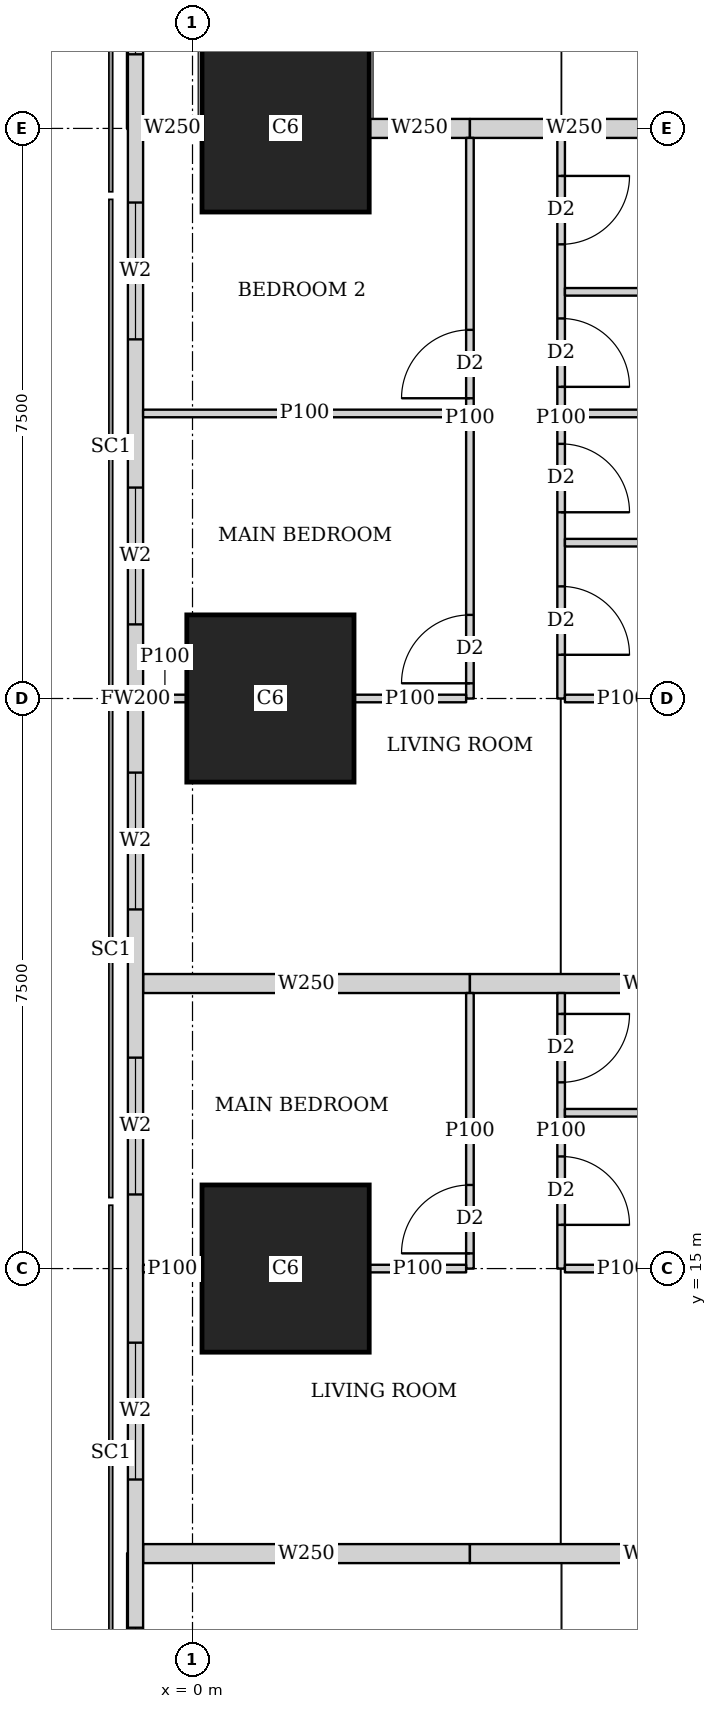
"""IFC4 building model, lengths in metres.
Left out: names, types, materials, properties, quantities, classifications, styles, units other than length and angle.
Written with IfcOpenShell. Run it as: python <this file> out.ifc"""

import sys

from ifc_helpers import new_model, si_unit, direction, frame, frame_2d, origin, origin_2d, place, context, subcontext, project, spatial, rectangle, extrude, element, fill, save


model = new_model("IFC4")
c1 = context("Model", 3, precision=1e-05, world=origin(), true_north=direction((0.0, 1.0)))
c2 = subcontext(c1, "Body", "Model", "MODEL_VIEW")
j1 = project(units=[si_unit("LENGTHUNIT", "METRE"), si_unit("PLANEANGLEUNIT", "RADIAN")], contexts=[c1])
p1 = place(None, origin())
s1 = spatial("IfcSite", under=j1, at=p1, CompositionType="ELEMENT")
p2 = place(p1, origin())
s2 = spatial("IfcBuilding", under=s1, at=p2, CompositionType="ELEMENT")
p3 = place(p2, frame((0.0, 0.0, 89.15)))
s3 = spatial("IfcBuildingStorey", under=s2, at=p3, CompositionType="ELEMENT", Elevation=89.15)
for number, where, z_axis, x_axis in (
    (1, (1.225, 15.0, 0.0), (0.0, 0.0, 1.0), (1.0, 0.0, 0.0)),
    (2, (1.025, 22.5, 0.0), (0.0, 0.0, 1.0), (1.0, 0.0, 0.0)),
    (3, (1.225, 30.0, 0.0), (0.0, 0.0, 1.0), (1.0, 0.0, 0.0)),
):
    element("IfcColumn", number, at=place(p3, frame(where, z_axis=z_axis, x_axis=x_axis)), inside=s3, PredefinedType="COLUMN", context=c2, shape_type="SweptSolid", body=[
        extrude(rectangle(XDim=2.2, YDim=2.2, at=origin_2d()), origin(), (0.0, 0.0, 1.0), 3.75),
    ])
p4 = place(p3, frame((-0.75, 42.837, 0.0), z_axis=(0.0, 0.0, 1.0), x_axis=(0.0, -1.0, 0.0)))
e4 = element("IfcWall", 4, at=p4, inside=s3, PredefinedType="SOLIDWALL", context=c2, shape_type="SweptSolid", body=[
    extrude(rectangle(XDim=40.674, YDim=0.2, at=frame_2d((20.337, 0.0))), origin(), (0.0, 0.0, 1.0), 3.5),
])
p5 = place(p4, frame((1.78, 0.0, 0.9)))
e5 = element("IfcOpeningElement", 5, at=p5, cuts=e4, PredefinedType="OPENING", context=c2, shape_type="SweptSolid", body=[
    extrude(rectangle(XDim=1.8, YDim=1.5, at=frame_2d((0.9, 0.75))), frame((0.0, 0.11, 0.0), z_axis=(0.0, -1.0, 0.0), x_axis=(1.0, 0.0, 0.0)), (0.0, 0.0, 1.0), 0.22),
])
p6 = place(p4, frame((6.312, 0.0, 0.9)))
e6 = element("IfcOpeningElement", 6, at=p6, cuts=e4, PredefinedType="OPENING", context=c2, shape_type="SweptSolid", body=[
    extrude(rectangle(XDim=1.8, YDim=1.5, at=frame_2d((0.9, 0.75))), frame((0.0, 0.11, 0.0), z_axis=(0.0, -1.0, 0.0), x_axis=(1.0, 0.0, 0.0)), (0.0, 0.0, 1.0), 0.22),
])
p7 = place(p4, frame((10.062, 0.0, 0.9)))
e7 = element("IfcOpeningElement", 7, at=p7, cuts=e4, PredefinedType="OPENING", context=c2, shape_type="SweptSolid", body=[
    extrude(rectangle(XDim=1.8, YDim=1.5, at=frame_2d((0.9, 0.75))), frame((0.0, 0.11, 0.0), z_axis=(0.0, -1.0, 0.0), x_axis=(1.0, 0.0, 0.0)), (0.0, 0.0, 1.0), 0.22),
])
p8 = place(p4, frame((13.812, 0.0, 0.9)))
e8 = element("IfcOpeningElement", 8, at=p8, cuts=e4, PredefinedType="OPENING", context=c2, shape_type="SweptSolid", body=[
    extrude(rectangle(XDim=1.8, YDim=1.5, at=frame_2d((0.9, 0.75))), frame((0.0, 0.11, 0.0), z_axis=(0.0, -1.0, 0.0), x_axis=(1.0, 0.0, 0.0)), (0.0, 0.0, 1.0), 0.22),
])
p9 = place(p4, frame((17.562, 0.0, 0.9)))
e9 = element("IfcOpeningElement", 9, at=p9, cuts=e4, PredefinedType="OPENING", context=c2, shape_type="SweptSolid", body=[
    extrude(rectangle(XDim=1.8, YDim=1.5, at=frame_2d((0.9, 0.75))), frame((0.0, 0.11, 0.0), z_axis=(0.0, -1.0, 0.0), x_axis=(1.0, 0.0, 0.0)), (0.0, 0.0, 1.0), 0.22),
])
p10 = place(p4, frame((21.312, 0.0, 0.9)))
e10 = element("IfcOpeningElement", 10, at=p10, cuts=e4, PredefinedType="OPENING", context=c2, shape_type="SweptSolid", body=[
    extrude(rectangle(XDim=1.8, YDim=1.5, at=frame_2d((0.9, 0.75))), frame((0.0, 0.11, 0.0), z_axis=(0.0, -1.0, 0.0), x_axis=(1.0, 0.0, 0.0)), (0.0, 0.0, 1.0), 0.22),
])
p11 = place(p4, frame((25.062, 0.0, 0.9)))
e11 = element("IfcOpeningElement", 11, at=p11, cuts=e4, PredefinedType="OPENING", context=c2, shape_type="SweptSolid", body=[
    extrude(rectangle(XDim=1.8, YDim=1.5, at=frame_2d((0.9, 0.75))), frame((0.0, 0.11, 0.0), z_axis=(0.0, -1.0, 0.0), x_axis=(1.0, 0.0, 0.0)), (0.0, 0.0, 1.0), 0.22),
])
p12 = place(p4, frame((28.812, 0.0, 0.9)))
e12 = element("IfcOpeningElement", 12, at=p12, cuts=e4, PredefinedType="OPENING", context=c2, shape_type="SweptSolid", body=[
    extrude(rectangle(XDim=1.8, YDim=1.5, at=frame_2d((0.9, 0.75))), frame((0.0, 0.11, 0.0), z_axis=(0.0, -1.0, 0.0), x_axis=(1.0, 0.0, 0.0)), (0.0, 0.0, 1.0), 0.22),
])
p13 = place(p4, frame((32.562, 0.0, 0.9)))
e13 = element("IfcOpeningElement", 13, at=p13, cuts=e4, PredefinedType="OPENING", context=c2, shape_type="SweptSolid", body=[
    extrude(rectangle(XDim=1.8, YDim=1.5, at=frame_2d((0.9, 0.75))), frame((0.0, 0.11, 0.0), z_axis=(0.0, -1.0, 0.0), x_axis=(1.0, 0.0, 0.0)), (0.0, 0.0, 1.0), 0.22),
])
p14 = place(p4, frame((37.094, 0.0, 0.9)))
e14 = element("IfcOpeningElement", 14, at=p14, cuts=e4, PredefinedType="OPENING", context=c2, shape_type="SweptSolid", body=[
    extrude(rectangle(XDim=1.8, YDim=1.5, at=frame_2d((0.9, 0.75))), frame((0.0, 0.11, 0.0), z_axis=(0.0, -1.0, 0.0), x_axis=(1.0, 0.0, 0.0)), (0.0, 0.0, 1.0), 0.22),
])
p15 = place(p3, frame((3.65, 15.0, 0.0), z_axis=(0.0, 0.0, 1.0), x_axis=(0.0, 1.0, 0.0)))
e15 = element("IfcWall", 15, at=p15, inside=s3, PredefinedType="PARTITIONING", context=c2, shape_type="SweptSolid", body=[
    extrude(rectangle(XDim=3.625, YDim=0.1, at=frame_2d((1.812, 0.0))), origin(), (0.0, 0.0, 1.0), 3.5),
])
p16 = place(p15, frame((0.2, 0.0, 0.0)))
e16 = element("IfcOpeningElement", 16, at=p16, cuts=e15, PredefinedType="OPENING", context=c2, shape_type="SweptSolid", body=[
    extrude(rectangle(XDim=0.9, YDim=2.1, at=frame_2d((0.45, 1.05))), frame((0.0, 0.06, 0.0), z_axis=(0.0, -1.0, 0.0), x_axis=(1.0, 0.0, 0.0)), (0.0, 0.0, 1.0), 0.12),
])
p17 = place(p3, frame((4.85, 15.0, 0.0), z_axis=(0.0, 0.0, 1.0), x_axis=(0.0, 1.0, 0.0)))
e17 = element("IfcWall", 17, at=p17, inside=s3, PredefinedType="PARTITIONING", context=c2, shape_type="SweptSolid", body=[
    extrude(rectangle(XDim=3.625, YDim=0.1, at=frame_2d((1.812, 0.0))), origin(), (0.0, 0.0, 1.0), 3.5),
])
p18 = place(p17, frame((0.575, 0.0, 0.0)))
e18 = element("IfcOpeningElement", 18, at=p18, cuts=e17, PredefinedType="OPENING", context=c2, shape_type="SweptSolid", body=[
    extrude(rectangle(XDim=0.9, YDim=2.1, at=frame_2d((0.45, 1.05))), frame((0.0, 0.06, 0.0), z_axis=(0.0, -1.0, 0.0), x_axis=(1.0, 0.0, 0.0)), (0.0, 0.0, 1.0), 0.12),
])
p19 = place(p17, frame((2.45, 0.0, 0.0)))
e19 = element("IfcOpeningElement", 19, at=p19, cuts=e17, PredefinedType="OPENING", context=c2, shape_type="SweptSolid", body=[
    extrude(rectangle(XDim=0.9, YDim=2.1, at=frame_2d((0.45, 1.05))), frame((0.0, 0.06, 0.0), z_axis=(0.0, -1.0, 0.0), x_axis=(1.0, 0.0, 0.0)), (0.0, 0.0, 1.0), 0.12),
])
p20 = place(p3, frame((-0.65, 15.0, 0.0), z_axis=(0.0, 0.0, 1.0), x_axis=(1.0, 0.0, 0.0)))
e20 = element("IfcWall", 20, at=p20, inside=s3, PredefinedType="PARTITIONING", context=c2, shape_type="SweptSolid", body=[
    extrude(rectangle(XDim=0.774, YDim=0.1, at=frame_2d((0.387, 0.0))), origin(), (0.0, 0.0, 1.0), 3.5),
])
p21 = place(p3, frame((2.326, 15.0, 0.0), z_axis=(0.0, 0.0, 1.0), x_axis=(1.0, 0.0, 0.0)))
e21 = element("IfcWall", 21, at=p21, inside=s3, PredefinedType="PARTITIONING", context=c2, shape_type="SweptSolid", body=[
    extrude(rectangle(XDim=1.274, YDim=0.1, at=frame_2d((0.637, 0.0))), origin(), (0.0, 0.0, 1.0), 3.5),
])
p22 = place(p3, frame((4.9, 15.0, 0.0), z_axis=(0.0, 0.0, 1.0), x_axis=(1.0, 0.0, 0.0)))
e22 = element("IfcWall", 22, at=p22, inside=s3, PredefinedType="PARTITIONING", context=c2, shape_type="SweptSolid", body=[
    extrude(rectangle(XDim=1.499, YDim=0.1, at=frame_2d((0.75, 0.0))), origin(), (0.0, 0.0, 1.0), 3.5),
])
p23 = place(p3, frame((4.9, 17.05, 0.0), z_axis=(0.0, 0.0, 1.0), x_axis=(1.0, 0.0, 0.0)))
e23 = element("IfcWall", 23, at=p23, inside=s3, PredefinedType="PARTITIONING", context=c2, shape_type="SweptSolid", body=[
    extrude(rectangle(XDim=3.525, YDim=0.1, at=frame_2d((1.763, 0.0))), origin(), (0.0, 0.0, 1.0), 3.5),
])
p24 = place(p3, frame((-0.65, 11.25, 0.0), z_axis=(0.0, 0.0, 1.0), x_axis=(1.0, 0.0, 0.0)))
e24 = element("IfcWall", 24, at=p24, inside=s3, PredefinedType="SOLIDWALL", context=c2, shape_type="SweptSolid", body=[
    extrude(rectangle(XDim=4.3, YDim=0.25, at=frame_2d((2.15, 0.0))), origin(), (0.0, 0.0, 1.0), 2.2),
])
p25 = place(p3, frame((3.65, 11.25, 0.0), z_axis=(0.0, 0.0, 1.0), x_axis=(1.0, 0.0, 0.0)))
e25 = element("IfcWall", 25, at=p25, inside=s3, PredefinedType="SOLIDWALL", context=c2, shape_type="SweptSolid", body=[
    extrude(rectangle(XDim=4.775, YDim=0.25, at=frame_2d((2.388, 0.0))), origin(), (0.0, 0.0, 1.0), 3.5),
])
p26 = place(p3, frame((3.65, 22.5, 0.0), z_axis=(0.0, 0.0, 1.0), x_axis=(0.0, 1.0, 0.0)))
e26 = element("IfcWall", 26, at=p26, inside=s3, PredefinedType="PARTITIONING", context=c2, shape_type="SweptSolid", body=[
    extrude(rectangle(XDim=7.375, YDim=0.1, at=frame_2d((3.688, 0.0))), origin(), (0.0, 0.0, 1.0), 3.5),
])
p27 = place(p26, frame((0.2, 0.0, 0.0)))
e27 = element("IfcOpeningElement", 27, at=p27, cuts=e26, PredefinedType="OPENING", context=c2, shape_type="SweptSolid", body=[
    extrude(rectangle(XDim=0.9, YDim=2.1, at=frame_2d((0.45, 1.05))), frame((0.0, 0.06, 0.0), z_axis=(0.0, -1.0, 0.0), x_axis=(1.0, 0.0, 0.0)), (0.0, 0.0, 1.0), 0.12),
])
p28 = place(p26, frame((3.95, 0.0, 0.0)))
e28 = element("IfcOpeningElement", 28, at=p28, cuts=e26, PredefinedType="OPENING", context=c2, shape_type="SweptSolid", body=[
    extrude(rectangle(XDim=0.9, YDim=2.1, at=frame_2d((0.45, 1.05))), frame((0.0, 0.06, 0.0), z_axis=(0.0, -1.0, 0.0), x_axis=(1.0, 0.0, 0.0)), (0.0, 0.0, 1.0), 0.12),
])
p29 = place(p3, frame((4.85, 22.5, 0.0), z_axis=(0.0, 0.0, 1.0), x_axis=(0.0, 1.0, 0.0)))
e29 = element("IfcWall", 29, at=p29, inside=s3, PredefinedType="PARTITIONING", context=c2, shape_type="SweptSolid", body=[
    extrude(rectangle(XDim=7.375, YDim=0.1, at=frame_2d((3.688, 0.0))), origin(), (0.0, 0.0, 1.0), 3.5),
])
p30 = place(p29, frame((0.575, 0.0, 0.0)))
e30 = element("IfcOpeningElement", 30, at=p30, cuts=e29, PredefinedType="OPENING", context=c2, shape_type="SweptSolid", body=[
    extrude(rectangle(XDim=0.9, YDim=2.1, at=frame_2d((0.45, 1.05))), frame((0.0, 0.06, 0.0), z_axis=(0.0, -1.0, 0.0), x_axis=(1.0, 0.0, 0.0)), (0.0, 0.0, 1.0), 0.12),
])
p31 = place(p29, frame((4.1, 0.0, 0.0)))
e31 = element("IfcOpeningElement", 31, at=p31, cuts=e29, PredefinedType="OPENING", context=c2, shape_type="SweptSolid", body=[
    extrude(rectangle(XDim=0.9, YDim=2.1, at=frame_2d((0.45, 1.05))), frame((0.0, 0.06, 0.0), z_axis=(0.0, -1.0, 0.0), x_axis=(1.0, 0.0, 0.0)), (0.0, 0.0, 1.0), 0.12),
])
p32 = place(p29, frame((2.45, 0.0, 0.0)))
e32 = element("IfcOpeningElement", 32, at=p32, cuts=e29, PredefinedType="OPENING", context=c2, shape_type="SweptSolid", body=[
    extrude(rectangle(XDim=0.9, YDim=2.1, at=frame_2d((0.45, 1.05))), frame((0.0, 0.06, 0.0), z_axis=(0.0, -1.0, 0.0), x_axis=(1.0, 0.0, 0.0)), (0.0, 0.0, 1.0), 0.12),
])
p33 = place(p29, frame((5.975, 0.0, 0.0)))
e33 = element("IfcOpeningElement", 33, at=p33, cuts=e29, PredefinedType="OPENING", context=c2, shape_type="SweptSolid", body=[
    extrude(rectangle(XDim=0.9, YDim=2.1, at=frame_2d((0.45, 1.05))), frame((0.0, 0.06, 0.0), z_axis=(0.0, -1.0, 0.0), x_axis=(1.0, 0.0, 0.0)), (0.0, 0.0, 1.0), 0.12),
])
p34 = place(p3, frame((-0.65, 22.5, 0.0), z_axis=(0.0, 0.0, 1.0), x_axis=(1.0, 0.0, 0.0)))
e34 = element("IfcWall", 34, at=p34, inside=s3, PredefinedType="PARTITIONING", context=c2, shape_type="SweptSolid", body=[
    extrude(rectangle(XDim=0.574, YDim=0.1, at=frame_2d((0.287, 0.0))), origin(), (0.0, 0.0, 1.0), 3.5),
])
p35 = place(p3, frame((2.126, 22.5, 0.0), z_axis=(0.0, 0.0, 1.0), x_axis=(1.0, 0.0, 0.0)))
e35 = element("IfcWall", 35, at=p35, inside=s3, PredefinedType="PARTITIONING", context=c2, shape_type="SweptSolid", body=[
    extrude(rectangle(XDim=1.474, YDim=0.1, at=frame_2d((0.737, 0.0))), origin(), (0.0, 0.0, 1.0), 3.5),
])
p36 = place(p3, frame((-0.65, 26.25, 0.0), z_axis=(0.0, 0.0, 1.0), x_axis=(1.0, 0.0, 0.0)))
e36 = element("IfcWall", 36, at=p36, inside=s3, PredefinedType="PARTITIONING", context=c2, shape_type="SweptSolid", body=[
    extrude(rectangle(XDim=4.25, YDim=0.1, at=frame_2d((2.125, 0.0))), origin(), (0.0, 0.0, 1.0), 2.2),
])
p37 = place(p3, frame((4.9, 22.5, 0.0), z_axis=(0.0, 0.0, 1.0), x_axis=(1.0, 0.0, 0.0)))
e37 = element("IfcWall", 37, at=p37, inside=s3, PredefinedType="PARTITIONING", context=c2, shape_type="SweptSolid", body=[
    extrude(rectangle(XDim=1.499, YDim=0.1, at=frame_2d((0.75, 0.0))), origin(), (0.0, 0.0, 1.0), 3.5),
])
for number, where, z_axis, x_axis in (
    (38, (4.9, 26.25, 0.0), (0.0, 0.0, 1.0), (1.0, 0.0, 0.0)),
    (39, (4.9, 24.55, 0.0), (0.0, 0.0, 1.0), (1.0, 0.0, 0.0)),
    (40, (4.9, 27.85, 0.0), (0.0, 0.0, 1.0), (1.0, 0.0, 0.0)),
):
    element("IfcWall", number, at=place(p3, frame(where, z_axis=z_axis, x_axis=x_axis)), inside=s3, PredefinedType="PARTITIONING", context=c2, shape_type="SweptSolid", body=[
        extrude(rectangle(XDim=3.525, YDim=0.1, at=frame_2d((1.763, 0.0))), origin(), (0.0, 0.0, 1.0), 3.5),
    ])
p38 = place(p3, frame((-0.65, 18.75, 0.0), z_axis=(0.0, 0.0, 1.0), x_axis=(1.0, 0.0, 0.0)))
e41 = element("IfcWall", 41, at=p38, inside=s3, PredefinedType="SOLIDWALL", context=c2, shape_type="SweptSolid", body=[
    extrude(rectangle(XDim=4.3, YDim=0.25, at=frame_2d((2.15, 0.0))), origin(), (0.0, 0.0, 1.0), 2.2),
])
p39 = place(p3, frame((3.65, 18.75, 0.0), z_axis=(0.0, 0.0, 1.0), x_axis=(1.0, 0.0, 0.0)))
e42 = element("IfcWall", 42, at=p39, inside=s3, PredefinedType="SOLIDWALL", context=c2, shape_type="SweptSolid", body=[
    extrude(rectangle(XDim=4.775, YDim=0.25, at=frame_2d((2.388, 0.0))), origin(), (0.0, 0.0, 1.0), 3.5),
])
p40 = place(p3, frame((-0.65, 30.0, 0.0), z_axis=(0.0, 0.0, 1.0), x_axis=(1.0, 0.0, 0.0)))
e43 = element("IfcWall", 43, at=p40, inside=s3, PredefinedType="SOLIDWALL", context=c2, shape_type="SweptSolid", body=[
    extrude(rectangle(XDim=0.774, YDim=0.25, at=frame_2d((0.387, 0.0))), origin(), (0.0, 0.0, 1.0), 3.5),
])
p41 = place(p3, frame((2.326, 30.0, 0.0), z_axis=(0.0, 0.0, 1.0), x_axis=(1.0, 0.0, 0.0)))
e44 = element("IfcWall", 44, at=p41, inside=s3, PredefinedType="SOLIDWALL", context=c2, shape_type="SweptSolid", body=[
    extrude(rectangle(XDim=1.324, YDim=0.25, at=frame_2d((0.662, 0.0))), origin(), (0.0, 0.0, 1.0), 3.5),
])
p42 = place(p3, frame((3.65, 30.0, 0.0), z_axis=(0.0, 0.0, 1.0), x_axis=(1.0, 0.0, 0.0)))
e45 = element("IfcWall", 45, at=p42, inside=s3, PredefinedType="SOLIDWALL", context=c2, shape_type="SweptSolid", body=[
    extrude(rectangle(XDim=2.749, YDim=0.25, at=frame_2d((1.375, 0.0))), origin(), (0.0, 0.0, 1.0), 3.5),
])
p43 = place(p7, origin())
e46 = element("IfcWindow", 46, at=p43, inside=s3, PartitioningType="SINGLE_PANEL", PredefinedType="WINDOW", context=c2, shape_type="SweptSolid", body=[
    extrude(rectangle(XDim=1.8, YDim=1.5, at=frame_2d((0.9, 0.75))), frame((0.0, 0.03, 0.0), z_axis=(0.0, -1.0, 0.0), x_axis=(1.0, 0.0, 0.0)), (0.0, 0.0, 1.0), 0.06),
])
fill(e7, e46)
p44 = place(p8, origin())
e47 = element("IfcWindow", 47, at=p44, inside=s3, PartitioningType="SINGLE_PANEL", PredefinedType="WINDOW", context=c2, shape_type="SweptSolid", body=[
    extrude(rectangle(XDim=1.8, YDim=1.5, at=frame_2d((0.9, 0.75))), frame((0.0, 0.03, 0.0), z_axis=(0.0, -1.0, 0.0), x_axis=(1.0, 0.0, 0.0)), (0.0, 0.0, 1.0), 0.06),
])
fill(e8, e47)
p45 = place(p9, origin())
e48 = element("IfcWindow", 48, at=p45, inside=s3, PartitioningType="SINGLE_PANEL", PredefinedType="WINDOW", context=c2, shape_type="SweptSolid", body=[
    extrude(rectangle(XDim=1.8, YDim=1.5, at=frame_2d((0.9, 0.75))), frame((0.0, 0.03, 0.0), z_axis=(0.0, -1.0, 0.0), x_axis=(1.0, 0.0, 0.0)), (0.0, 0.0, 1.0), 0.06),
])
fill(e9, e48)
p46 = place(p10, origin())
e49 = element("IfcWindow", 49, at=p46, inside=s3, PartitioningType="SINGLE_PANEL", PredefinedType="WINDOW", context=c2, shape_type="SweptSolid", body=[
    extrude(rectangle(XDim=1.8, YDim=1.5, at=frame_2d((0.9, 0.75))), frame((0.0, 0.03, 0.0), z_axis=(0.0, -1.0, 0.0), x_axis=(1.0, 0.0, 0.0)), (0.0, 0.0, 1.0), 0.06),
])
fill(e10, e49)
p47 = place(p11, origin())
e50 = element("IfcWindow", 50, at=p47, inside=s3, PartitioningType="SINGLE_PANEL", PredefinedType="WINDOW", context=c2, shape_type="SweptSolid", body=[
    extrude(rectangle(XDim=1.8, YDim=1.5, at=frame_2d((0.9, 0.75))), frame((0.0, 0.03, 0.0), z_axis=(0.0, -1.0, 0.0), x_axis=(1.0, 0.0, 0.0)), (0.0, 0.0, 1.0), 0.06),
])
fill(e11, e50)
p48 = place(p12, origin())
e51 = element("IfcWindow", 51, at=p48, inside=s3, PartitioningType="SINGLE_PANEL", PredefinedType="WINDOW", context=c2, shape_type="SweptSolid", body=[
    extrude(rectangle(XDim=1.8, YDim=1.5, at=frame_2d((0.9, 0.75))), frame((0.0, 0.03, 0.0), z_axis=(0.0, -1.0, 0.0), x_axis=(1.0, 0.0, 0.0)), (0.0, 0.0, 1.0), 0.06),
])
fill(e12, e51)
p49 = place(p13, origin())
e52 = element("IfcWindow", 52, at=p49, inside=s3, PartitioningType="SINGLE_PANEL", PredefinedType="WINDOW", context=c2, shape_type="SweptSolid", body=[
    extrude(rectangle(XDim=1.8, YDim=1.5, at=frame_2d((0.9, 0.75))), frame((0.0, 0.03, 0.0), z_axis=(0.0, -1.0, 0.0), x_axis=(1.0, 0.0, 0.0)), (0.0, 0.0, 1.0), 0.06),
])
fill(e13, e52)
p50 = place(p16, origin())
e53 = element("IfcDoor", 53, at=p50, inside=s3, OperationType="SINGLE_SWING_LEFT", PredefinedType="DOOR", context=c2, shape_type="SweptSolid", body=[
    extrude(rectangle(XDim=0.9, YDim=2.1, at=frame_2d((0.45, 1.05))), frame((0.0, 0.025, 0.0), z_axis=(0.0, -1.0, 0.0), x_axis=(1.0, 0.0, 0.0)), (0.0, 0.0, 1.0), 0.05),
])
fill(e16, e53)
p51 = place(p18, origin())
e54 = element("IfcDoor", 54, at=p51, inside=s3, OperationType="SINGLE_SWING_RIGHT", PredefinedType="DOOR", context=c2, shape_type="SweptSolid", body=[
    extrude(rectangle(XDim=0.9, YDim=2.1, at=frame_2d((0.45, 1.05))), frame((0.0, 0.025, 0.0), z_axis=(0.0, -1.0, 0.0), x_axis=(1.0, 0.0, 0.0)), (0.0, 0.0, 1.0), 0.05),
])
fill(e18, e54)
p52 = place(p19, origin())
e55 = element("IfcDoor", 55, at=p52, inside=s3, OperationType="SINGLE_SWING_LEFT", PredefinedType="DOOR", context=c2, shape_type="SweptSolid", body=[
    extrude(rectangle(XDim=0.9, YDim=2.1, at=frame_2d((0.45, 1.05))), frame((0.0, 0.025, 0.0), z_axis=(0.0, -1.0, 0.0), x_axis=(1.0, 0.0, 0.0)), (0.0, 0.0, 1.0), 0.05),
])
fill(e19, e55)
p53 = place(p27, origin())
e56 = element("IfcDoor", 56, at=p53, inside=s3, OperationType="SINGLE_SWING_LEFT", PredefinedType="DOOR", context=c2, shape_type="SweptSolid", body=[
    extrude(rectangle(XDim=0.9, YDim=2.1, at=frame_2d((0.45, 1.05))), frame((0.0, 0.025, 0.0), z_axis=(0.0, -1.0, 0.0), x_axis=(1.0, 0.0, 0.0)), (0.0, 0.0, 1.0), 0.05),
])
fill(e27, e56)
p54 = place(p28, origin())
e57 = element("IfcDoor", 57, at=p54, inside=s3, OperationType="SINGLE_SWING_LEFT", PredefinedType="DOOR", context=c2, shape_type="SweptSolid", body=[
    extrude(rectangle(XDim=0.9, YDim=2.1, at=frame_2d((0.45, 1.05))), frame((0.0, 0.025, 0.0), z_axis=(0.0, -1.0, 0.0), x_axis=(1.0, 0.0, 0.0)), (0.0, 0.0, 1.0), 0.05),
])
fill(e28, e57)
p55 = place(p30, origin())
e58 = element("IfcDoor", 58, at=p55, inside=s3, OperationType="SINGLE_SWING_RIGHT", PredefinedType="DOOR", context=c2, shape_type="SweptSolid", body=[
    extrude(rectangle(XDim=0.9, YDim=2.1, at=frame_2d((0.45, 1.05))), frame((0.0, 0.025, 0.0), z_axis=(0.0, -1.0, 0.0), x_axis=(1.0, 0.0, 0.0)), (0.0, 0.0, 1.0), 0.05),
])
fill(e30, e58)
p56 = place(p31, origin())
e59 = element("IfcDoor", 59, at=p56, inside=s3, OperationType="SINGLE_SWING_RIGHT", PredefinedType="DOOR", context=c2, shape_type="SweptSolid", body=[
    extrude(rectangle(XDim=0.9, YDim=2.1, at=frame_2d((0.45, 1.05))), frame((0.0, 0.025, 0.0), z_axis=(0.0, -1.0, 0.0), x_axis=(1.0, 0.0, 0.0)), (0.0, 0.0, 1.0), 0.05),
])
fill(e31, e59)
p57 = place(p32, origin())
e60 = element("IfcDoor", 60, at=p57, inside=s3, OperationType="SINGLE_SWING_RIGHT", PredefinedType="DOOR", context=c2, shape_type="SweptSolid", body=[
    extrude(rectangle(XDim=0.9, YDim=2.1, at=frame_2d((0.45, 1.05))), frame((0.0, 0.025, 0.0), z_axis=(0.0, -1.0, 0.0), x_axis=(1.0, 0.0, 0.0)), (0.0, 0.0, 1.0), 0.05),
])
fill(e32, e60)
p58 = place(p33, origin())
e61 = element("IfcDoor", 61, at=p58, inside=s3, OperationType="SINGLE_SWING_LEFT", PredefinedType="DOOR", context=c2, shape_type="SweptSolid", body=[
    extrude(rectangle(XDim=0.9, YDim=2.1, at=frame_2d((0.45, 1.05))), frame((0.0, 0.025, 0.0), z_axis=(0.0, -1.0, 0.0), x_axis=(1.0, 0.0, 0.0)), (0.0, 0.0, 1.0), 0.05),
])
fill(e33, e61)
save(model, sys.argv[1])
